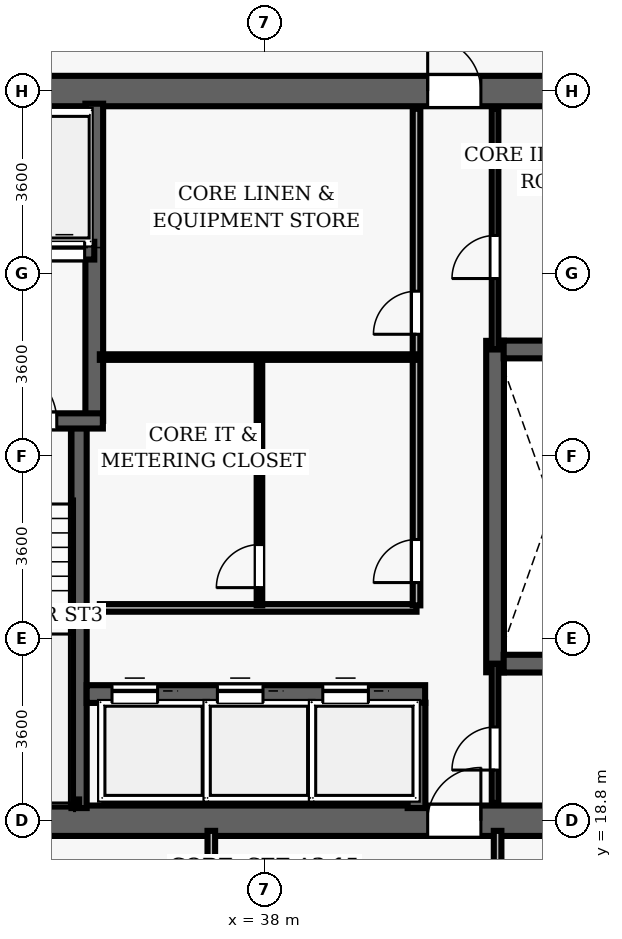
"""IFC4 building model, lengths in metres.
Left out: names, types, materials, properties, quantities, classifications, styles, units other than length and angle.
Written with IfcOpenShell. Run it as: python <this file> out.ifc"""

import sys

from ifc_helpers import new_model, si_unit, direction, frame, frame_2d, origin, place, context, subcontext, project, spatial, rectangle, extrude, element, fill, save


model = new_model("IFC4")
c1 = context("Model", 3, precision=1e-05, world=origin(), true_north=direction((0.0, 1.0)))
c2 = subcontext(c1, "Body", "Model", "MODEL_VIEW")
j1 = project(units=[si_unit("LENGTHUNIT", "METRE"), si_unit("PLANEANGLEUNIT", "RADIAN")], contexts=[c1])
p1 = place(None, origin())
s1 = spatial("IfcSite", under=j1, at=p1, CompositionType="ELEMENT")
p2 = place(p1, origin())
s2 = spatial("IfcBuilding", under=s1, at=p2, CompositionType="ELEMENT")
p3 = place(p2, frame((0.0, 0.0, 127.3)))
s3 = spatial("IfcBuildingStorey", under=s2, at=p3, CompositionType="ELEMENT", Elevation=127.3)
p4 = place(p3, frame((26.7, 18.8, 0.0), z_axis=(0.0, 0.0, 1.0), x_axis=(1.0, 0.0, 0.0)))
e1 = element("IfcWall", 1, at=p4, inside=s3, PredefinedType="SHEAR", context=c2, shape_type="SweptSolid", body=[
    extrude(rectangle(XDim=22.6, YDim=0.6, at=frame_2d((11.3, 0.0))), origin(), (0.0, 0.0, 1.0), 3.5),
])
p5 = place(p4, frame((14.52, 0.0, 0.0)))
e2 = element("IfcOpeningElement", 2, at=p5, cuts=e1, PredefinedType="OPENING", context=c2, shape_type="SweptSolid", body=[
    extrude(rectangle(XDim=1.05, YDim=2.15, at=frame_2d((0.525, 1.075))), frame((0.0, 0.31, 0.0), z_axis=(0.0, -1.0, 0.0), x_axis=(1.0, 0.0, 0.0)), (0.0, 0.0, 1.0), 0.62),
])
p6 = place(p3, frame((26.7, 33.2, 0.0), z_axis=(0.0, 0.0, 1.0), x_axis=(1.0, 0.0, 0.0)))
e3 = element("IfcWall", 3, at=p6, inside=s3, PredefinedType="SHEAR", context=c2, shape_type="SweptSolid", body=[
    extrude(rectangle(XDim=22.6, YDim=0.6, at=frame_2d((11.3, 0.0))), origin(), (0.0, 0.0, 1.0), 3.5),
])
p7 = place(p6, frame((4.62, 0.0, 0.0)))
e4 = element("IfcOpeningElement", 4, at=p7, cuts=e3, PredefinedType="OPENING", context=c2, shape_type="SweptSolid", body=[
    extrude(rectangle(XDim=1.05, YDim=2.15, at=frame_2d((0.525, 1.075))), frame((0.0, 0.31, 0.0), z_axis=(0.0, -1.0, 0.0), x_axis=(1.0, 0.0, 0.0)), (0.0, 0.0, 1.0), 0.62),
])
p8 = place(p6, frame((14.52, 0.0, 0.0)))
e5 = element("IfcOpeningElement", 5, at=p8, cuts=e3, PredefinedType="OPENING", context=c2, shape_type="SweptSolid", body=[
    extrude(rectangle(XDim=1.05, YDim=2.15, at=frame_2d((0.525, 1.075))), frame((0.0, 0.31, 0.0), z_axis=(0.0, -1.0, 0.0), x_axis=(1.0, 0.0, 0.0)), (0.0, 0.0, 1.0), 0.62),
])
p9 = place(p3, frame((34.34, 19.05, 0.0), z_axis=(0.0, 0.0, 1.0), x_axis=(0.0, 1.0, 0.0)))
e6 = element("IfcWall", 6, at=p9, inside=s3, PredefinedType="SHEAR", context=c2, shape_type="SweptSolid", body=[
    extrude(rectangle(XDim=7.5, YDim=0.3, at=frame_2d((3.75, 0.0))), origin(), (0.0, 0.0, 1.0), 3.5),
])
p10 = place(p3, frame((34.64, 26.69, 0.0), z_axis=(0.0, 0.0, 1.0), x_axis=(0.0, 1.0, 0.0)))
e7 = element("IfcWall", 7, at=p10, inside=s3, PredefinedType="SHEAR", context=c2, shape_type="SweptSolid", body=[
    extrude(rectangle(XDim=6.26, YDim=0.35, at=frame_2d((3.13, 0.0))), origin(), (0.0, 0.0, 1.0), 3.5),
])
p11 = place(p3, frame((31.25, 26.69, 0.0), z_axis=(0.0, 0.0, 1.0), x_axis=(1.0, 0.0, 0.0)))
e8 = element("IfcWall", 8, at=p11, inside=s3, PredefinedType="SHEAR", context=c2, shape_type="SweptSolid", body=[
    extrude(rectangle(XDim=3.56, YDim=0.3, at=frame_2d((1.78, 0.0))), origin(), (0.0, 0.0, 1.0), 3.5),
])
p12 = place(p11, frame((1.55, 0.0, 0.0)))
e9 = element("IfcOpeningElement", 9, at=p12, cuts=e8, PredefinedType="OPENING", context=c2, shape_type="SweptSolid", body=[
    extrude(rectangle(XDim=1.1, YDim=2.15, at=frame_2d((0.55, 1.075))), frame((0.0, 0.16, 0.0), z_axis=(0.0, -1.0, 0.0), x_axis=(1.0, 0.0, 0.0)), (0.0, 0.0, 1.0), 0.32),
])
p13 = place(p3, frame((31.3, 19.16, 0.0), z_axis=(0.0, 0.0, 1.0), x_axis=(1.0, 0.0, 0.0)))
e10 = element("IfcWall", 10, at=p13, inside=s3, PredefinedType="SHEAR", context=c2, shape_type="SweptSolid", body=[
    extrude(rectangle(XDim=3.04, YDim=0.12, at=frame_2d((1.52, 0.0))), origin(), (0.0, 0.0, 1.0), 3.5),
])
p14 = place(p3, frame((32.23, 30.05, 0.0), z_axis=(0.0, 0.0, 1.0), x_axis=(1.0, 0.0, 0.0)))
e11 = element("IfcWall", 11, at=p14, inside=s3, PredefinedType="SHEAR", context=c2, shape_type="SweptSolid", body=[
    extrude(rectangle(XDim=2.41, YDim=0.35, at=frame_2d((1.205, 0.0))), origin(), (0.0, 0.0, 1.0), 2.675),
])
p15 = place(p14, frame((0.42, 0.0, 0.0)))
e12 = element("IfcOpeningElement", 12, at=p15, cuts=e11, PredefinedType="OPENING", context=c2, shape_type="SweptSolid", body=[
    extrude(rectangle(XDim=0.8, YDim=2.15, at=frame_2d((0.4, 1.075))), frame((0.0, 0.185, 0.0), z_axis=(0.0, -1.0, 0.0), x_axis=(1.0, 0.0, 0.0)), (0.0, 0.0, 1.0), 0.37),
])
p16 = place(p14, frame((1.42, 0.0, 0.0)))
e13 = element("IfcOpeningElement", 13, at=p16, cuts=e11, PredefinedType="OPENING", context=c2, shape_type="SweptSolid", body=[
    extrude(rectangle(XDim=0.8, YDim=2.15, at=frame_2d((0.4, 1.075))), frame((0.0, 0.185, 0.0), z_axis=(0.0, -1.0, 0.0), x_axis=(1.0, 0.0, 0.0)), (0.0, 0.0, 1.0), 0.37),
])
p17 = place(p3, frame((42.55, 21.73, 0.0), z_axis=(0.0, 0.0, 1.0), x_axis=(0.0, 1.0, 0.0)))
e14 = element("IfcWall", 14, at=p17, inside=s3, PredefinedType="SHEAR", context=c2, shape_type="SweptSolid", body=[
    extrude(rectangle(XDim=6.54, YDim=0.35, at=frame_2d((3.27, 0.0))), origin(), (0.0, 0.0, 1.0), 2.675),
])
for number, where, z_axis, x_axis in (
    (15, (42.72, 21.9, 0.0), (0.0, 0.0, 1.0), (1.0, 0.0, 0.0)),
    (16, (42.72, 28.1, 0.0), (0.0, 0.0, 1.0), (1.0, 0.0, 0.0)),
):
    element("IfcWall", number, at=place(p3, frame(where, z_axis=z_axis, x_axis=x_axis)), inside=s3, PredefinedType="SHEAR", context=c2, shape_type="SweptSolid", body=[
        extrude(rectangle(XDim=2.03, YDim=0.35, at=frame_2d((1.015, 0.0))), origin(), (0.0, 0.0, 1.0), 2.675),
    ])
p18 = place(p3, frame((34.49, 21.3, 0.0), z_axis=(0.0, 0.0, 1.0), x_axis=(1.0, 0.0, 0.0)))
e17 = element("IfcWall", 17, at=p18, inside=s3, PredefinedType="SHEAR", context=c2, shape_type="SweptSolid", body=[
    extrude(rectangle(XDim=6.68, YDim=0.35, at=frame_2d((3.34, 0.0))), origin(), (0.0, 0.0, 1.0), 2.675),
])
p19 = place(p18, frame((0.5, 0.0, 0.0)))
e18 = element("IfcOpeningElement", 18, at=p19, cuts=e17, PredefinedType="OPENING", context=c2, shape_type="SweptSolid", body=[
    extrude(rectangle(XDim=0.9, YDim=2.15, at=frame_2d((0.45, 1.075))), frame((0.0, 0.185, 0.0), z_axis=(0.0, -1.0, 0.0), x_axis=(1.0, 0.0, 0.0)), (0.0, 0.0, 1.0), 0.37),
])
p20 = place(p18, frame((2.58, 0.0, 0.0)))
e19 = element("IfcOpeningElement", 19, at=p20, cuts=e17, PredefinedType="OPENING", context=c2, shape_type="SweptSolid", body=[
    extrude(rectangle(XDim=0.9, YDim=2.15, at=frame_2d((0.45, 1.075))), frame((0.0, 0.185, 0.0), z_axis=(0.0, -1.0, 0.0), x_axis=(1.0, 0.0, 0.0)), (0.0, 0.0, 1.0), 0.37),
])
p21 = place(p18, frame((4.66, 0.0, 0.0)))
e20 = element("IfcOpeningElement", 20, at=p21, cuts=e17, PredefinedType="OPENING", context=c2, shape_type="SweptSolid", body=[
    extrude(rectangle(XDim=0.9, YDim=2.15, at=frame_2d((0.45, 1.075))), frame((0.0, 0.185, 0.0), z_axis=(0.0, -1.0, 0.0), x_axis=(1.0, 0.0, 0.0)), (0.0, 0.0, 1.0), 0.37),
])
p22 = place(p3, frame((41.0, 19.05, 0.0), z_axis=(0.0, 0.0, 1.0), x_axis=(0.0, 1.0, 0.0)))
e21 = element("IfcWall", 21, at=p22, inside=s3, PredefinedType="SHEAR", context=c2, shape_type="SweptSolid", body=[
    extrude(rectangle(XDim=2.08, YDim=0.35, at=frame_2d((1.04, 0.0))), origin(), (0.0, 0.0, 1.0), 2.675),
])
p23 = place(p3, frame((34.75, 23.0, 0.0), z_axis=(0.0, 0.0, 1.0), x_axis=(1.0, 0.0, 0.0)))
e22 = element("IfcWall", 22, at=p23, inside=s3, PredefinedType="PARTITIONING", context=c2, shape_type="SweptSolid", body=[
    extrude(rectangle(XDim=6.25, YDim=0.15, at=frame_2d((3.125, 0.0))), origin(), (0.0, 0.0, 1.0), 2.675),
])
p24 = place(p3, frame((41.0, 23.05, 0.0), z_axis=(0.0, 0.0, 1.0), x_axis=(0.0, 1.0, 0.0)))
e23 = element("IfcWall", 23, at=p24, inside=s3, PredefinedType="PARTITIONING", context=c2, shape_type="SweptSolid", body=[
    extrude(rectangle(XDim=9.8, YDim=0.15, at=frame_2d((4.9, 0.0))), origin(), (0.0, 0.0, 1.0), 2.675),
])
p25 = place(p24, frame((5.35, 0.0, 0.0)))
e24 = element("IfcOpeningElement", 24, at=p25, cuts=e23, PredefinedType="OPENING", context=c2, shape_type="SweptSolid", body=[
    extrude(rectangle(XDim=0.85, YDim=2.1, at=frame_2d((0.425, 1.05))), frame((0.0, 0.085, 0.0), z_axis=(0.0, -1.0, 0.0), x_axis=(1.0, 0.0, 0.0)), (0.0, 0.0, 1.0), 0.17),
])
p26 = place(p24, frame((0.45, 0.0, 0.0)))
e25 = element("IfcOpeningElement", 25, at=p26, cuts=e23, PredefinedType="OPENING", context=c2, shape_type="SweptSolid", body=[
    extrude(rectangle(XDim=0.85, YDim=2.1, at=frame_2d((0.425, 1.05))), frame((0.0, 0.085, 0.0), z_axis=(0.0, -1.0, 0.0), x_axis=(1.0, 0.0, 0.0)), (0.0, 0.0, 1.0), 0.17),
])
p27 = place(p3, frame((34.75, 27.95, 0.0), z_axis=(0.0, 0.0, 1.0), x_axis=(1.0, 0.0, 0.0)))
e26 = element("IfcWall", 26, at=p27, inside=s3, PredefinedType="PARTITIONING", context=c2, shape_type="SweptSolid", body=[
    extrude(rectangle(XDim=6.25, YDim=0.11, at=frame_2d((3.125, 0.0))), origin(), (0.0, 0.0, 1.0), 2.675),
])
p28 = place(p3, frame((37.9, 23.05, 0.0), z_axis=(0.0, 0.0, 1.0), x_axis=(0.0, 1.0, 0.0)))
e27 = element("IfcWall", 27, at=p28, inside=s3, PredefinedType="PARTITIONING", context=c2, shape_type="SweptSolid", body=[
    extrude(rectangle(XDim=4.9, YDim=0.11, at=frame_2d((2.45, 0.0))), origin(), (0.0, 0.0, 1.0), 2.675),
])
p29 = place(p28, frame((0.35, 0.0, 0.0)))
e28 = element("IfcOpeningElement", 28, at=p29, cuts=e27, PredefinedType="OPENING", context=c2, shape_type="SweptSolid", body=[
    extrude(rectangle(XDim=0.85, YDim=2.1, at=frame_2d((0.425, 1.05))), frame((0.0, 0.065, 0.0), z_axis=(0.0, -1.0, 0.0), x_axis=(1.0, 0.0, 0.0)), (0.0, 0.0, 1.0), 0.13),
])
p30 = place(p3, frame((42.55, 28.1, 0.0), z_axis=(0.0, 0.0, 1.0), x_axis=(0.0, 1.0, 0.0)))
e29 = element("IfcWall", 29, at=p30, inside=s3, PredefinedType="PARTITIONING", context=c2, shape_type="SweptSolid", body=[
    extrude(rectangle(XDim=4.75, YDim=0.13, at=frame_2d((2.375, 0.0))), origin(), (0.0, 0.0, 1.0), 2.675),
])
p31 = place(p30, frame((1.4, 0.0, 0.0)))
e30 = element("IfcOpeningElement", 30, at=p31, cuts=e29, PredefinedType="OPENING", context=c2, shape_type="SweptSolid", body=[
    extrude(rectangle(XDim=0.85, YDim=2.1, at=frame_2d((0.425, 1.05))), frame((0.0, 0.075, 0.0), z_axis=(0.0, -1.0, 0.0), x_axis=(1.0, 0.0, 0.0)), (0.0, 0.0, 1.0), 0.15),
])
p32 = place(p3, frame((42.55, 19.15, 0.0), z_axis=(0.0, 0.0, 1.0), x_axis=(0.0, 1.0, 0.0)))
e31 = element("IfcWall", 31, at=p32, inside=s3, PredefinedType="PARTITIONING", context=c2, shape_type="SweptSolid", body=[
    extrude(rectangle(XDim=2.75, YDim=0.13, at=frame_2d((1.375, 0.0))), origin(), (0.0, 0.0, 1.0), 2.675),
])
p33 = place(p32, frame((0.65, 0.0, 0.0)))
e32 = element("IfcOpeningElement", 32, at=p33, cuts=e31, PredefinedType="OPENING", context=c2, shape_type="SweptSolid", body=[
    extrude(rectangle(XDim=0.85, YDim=2.1, at=frame_2d((0.425, 1.05))), frame((0.0, 0.075, 0.0), z_axis=(0.0, -1.0, 0.0), x_axis=(1.0, 0.0, 0.0)), (0.0, 0.0, 1.0), 0.15),
])
p34 = place(p3, frame((36.95, 11.2, 0.0), z_axis=(0.0, 0.0, 1.0), x_axis=(0.0, 1.0, 0.0)))
e33 = element("IfcWall", 33, at=p34, inside=s3, PredefinedType="PARTITIONING", context=c2, shape_type="SweptSolid", body=[
    extrude(rectangle(XDim=7.4, YDim=0.15, at=frame_2d((3.7, 0.0))), origin(), (0.0, 0.0, 1.0), 2.675),
])
p35 = place(p34, frame((5.075, 0.0, 0.0)))
e34 = element("IfcOpeningElement", 34, at=p35, cuts=e33, PredefinedType="OPENING", context=c2, shape_type="SweptSolid", body=[
    extrude(rectangle(XDim=0.95, YDim=2.15, at=frame_2d((0.475, 1.075))), frame((0.0, 0.085, 0.0), z_axis=(0.0, -1.0, 0.0), x_axis=(1.0, 0.0, 0.0)), (0.0, 0.0, 1.0), 0.17),
])
p36 = place(p3, frame((42.6, 16.65, 0.0), z_axis=(0.0, 0.0, 1.0), x_axis=(0.0, 1.0, 0.0)))
e35 = element("IfcWall", 35, at=p36, inside=s3, PredefinedType="PARTITIONING", context=c2, shape_type="SweptSolid", body=[
    extrude(rectangle(XDim=1.95, YDim=0.15, at=frame_2d((0.975, 0.0))), origin(), (0.0, 0.0, 1.0), 2.675),
])
p37 = place(p12, origin())
e36 = element("IfcDoor", 36, at=p37, inside=s3, OperationType="SINGLE_SWING_LEFT", PredefinedType="DOOR", context=c2, shape_type="SweptSolid", body=[
    extrude(rectangle(XDim=1.1, YDim=2.15, at=frame_2d((0.55, 1.075))), frame((0.0, 0.025, 0.0), z_axis=(0.0, -1.0, 0.0), x_axis=(1.0, 0.0, 0.0)), (0.0, 0.0, 1.0), 0.05),
])
fill(e9, e36)
p38 = place(p8, origin())
e37 = element("IfcDoor", 37, at=p38, inside=s3, OperationType="SINGLE_SWING_LEFT", PredefinedType="DOOR", context=c2, shape_type="SweptSolid", body=[
    extrude(rectangle(XDim=1.05, YDim=2.15, at=frame_2d((0.525, 1.075))), frame((0.0, 0.025, 0.0), z_axis=(0.0, -1.0, 0.0), x_axis=(1.0, 0.0, 0.0)), (0.0, 0.0, 1.0), 0.05),
])
fill(e5, e37)
p39 = place(p5, origin())
e38 = element("IfcDoor", 38, at=p39, inside=s3, OperationType="SINGLE_SWING_RIGHT", PredefinedType="DOOR", context=c2, shape_type="SweptSolid", body=[
    extrude(rectangle(XDim=1.05, YDim=2.15, at=frame_2d((0.525, 1.075))), frame((0.0, 0.025, 0.0), z_axis=(0.0, -1.0, 0.0), x_axis=(1.0, 0.0, 0.0)), (0.0, 0.0, 1.0), 0.05),
])
fill(e2, e38)
p40 = place(p25, origin())
e39 = element("IfcDoor", 39, at=p40, inside=s3, OperationType="SINGLE_SWING_LEFT", PredefinedType="DOOR", context=c2, shape_type="SweptSolid", body=[
    extrude(rectangle(XDim=0.85, YDim=2.1, at=frame_2d((0.425, 1.05))), frame((0.0, 0.025, 0.0), z_axis=(0.0, -1.0, 0.0), x_axis=(1.0, 0.0, 0.0)), (0.0, 0.0, 1.0), 0.05),
])
fill(e24, e39)
p41 = place(p26, origin())
e40 = element("IfcDoor", 40, at=p41, inside=s3, OperationType="SINGLE_SWING_LEFT", PredefinedType="DOOR", context=c2, shape_type="SweptSolid", body=[
    extrude(rectangle(XDim=0.85, YDim=2.1, at=frame_2d((0.425, 1.05))), frame((0.0, 0.025, 0.0), z_axis=(0.0, -1.0, 0.0), x_axis=(1.0, 0.0, 0.0)), (0.0, 0.0, 1.0), 0.05),
])
fill(e25, e40)
p42 = place(p29, origin())
e41 = element("IfcDoor", 41, at=p42, inside=s3, OperationType="SINGLE_SWING_LEFT", PredefinedType="DOOR", context=c2, shape_type="SweptSolid", body=[
    extrude(rectangle(XDim=0.85, YDim=2.1, at=frame_2d((0.425, 1.05))), frame((0.0, 0.025, 0.0), z_axis=(0.0, -1.0, 0.0), x_axis=(1.0, 0.0, 0.0)), (0.0, 0.0, 1.0), 0.05),
])
fill(e28, e41)
p43 = place(p31, origin())
e42 = element("IfcDoor", 42, at=p43, inside=s3, OperationType="SINGLE_SWING_LEFT", PredefinedType="DOOR", context=c2, shape_type="SweptSolid", body=[
    extrude(rectangle(XDim=0.85, YDim=2.1, at=frame_2d((0.425, 1.05))), frame((0.0, 0.025, 0.0), z_axis=(0.0, -1.0, 0.0), x_axis=(1.0, 0.0, 0.0)), (0.0, 0.0, 1.0), 0.05),
])
fill(e30, e42)
p44 = place(p33, origin())
e43 = element("IfcDoor", 43, at=p44, inside=s3, OperationType="SINGLE_SWING_LEFT", PredefinedType="DOOR", context=c2, shape_type="SweptSolid", body=[
    extrude(rectangle(XDim=0.85, YDim=2.1, at=frame_2d((0.425, 1.05))), frame((0.0, 0.025, 0.0), z_axis=(0.0, -1.0, 0.0), x_axis=(1.0, 0.0, 0.0)), (0.0, 0.0, 1.0), 0.05),
])
fill(e32, e43)
p45 = place(p19, origin())
e44 = element("IfcDoor", 44, at=p45, inside=s3, OperationType="SLIDING_TO_LEFT", PredefinedType="DOOR", context=c2, shape_type="SweptSolid", body=[
    extrude(rectangle(XDim=0.9, YDim=2.15, at=frame_2d((0.45, 1.075))), frame((0.0, 0.025, 0.0), z_axis=(0.0, -1.0, 0.0), x_axis=(1.0, 0.0, 0.0)), (0.0, 0.0, 1.0), 0.05),
])
fill(e18, e44)
p46 = place(p20, origin())
e45 = element("IfcDoor", 45, at=p46, inside=s3, OperationType="SLIDING_TO_LEFT", PredefinedType="DOOR", context=c2, shape_type="SweptSolid", body=[
    extrude(rectangle(XDim=0.9, YDim=2.15, at=frame_2d((0.45, 1.075))), frame((0.0, 0.025, 0.0), z_axis=(0.0, -1.0, 0.0), x_axis=(1.0, 0.0, 0.0)), (0.0, 0.0, 1.0), 0.05),
])
fill(e19, e45)
p47 = place(p21, origin())
e46 = element("IfcDoor", 46, at=p47, inside=s3, OperationType="SLIDING_TO_LEFT", PredefinedType="DOOR", context=c2, shape_type="SweptSolid", body=[
    extrude(rectangle(XDim=0.9, YDim=2.15, at=frame_2d((0.45, 1.075))), frame((0.0, 0.025, 0.0), z_axis=(0.0, -1.0, 0.0), x_axis=(1.0, 0.0, 0.0)), (0.0, 0.0, 1.0), 0.05),
])
fill(e20, e46)
p48 = place(p16, origin())
e47 = element("IfcDoor", 47, at=p48, inside=s3, OperationType="SLIDING_TO_LEFT", PredefinedType="DOOR", context=c2, shape_type="SweptSolid", body=[
    extrude(rectangle(XDim=0.8, YDim=2.15, at=frame_2d((0.4, 1.075))), frame((0.0, 0.025, 0.0), z_axis=(0.0, -1.0, 0.0), x_axis=(1.0, 0.0, 0.0)), (0.0, 0.0, 1.0), 0.05),
])
fill(e13, e47)
save(model, sys.argv[1])
